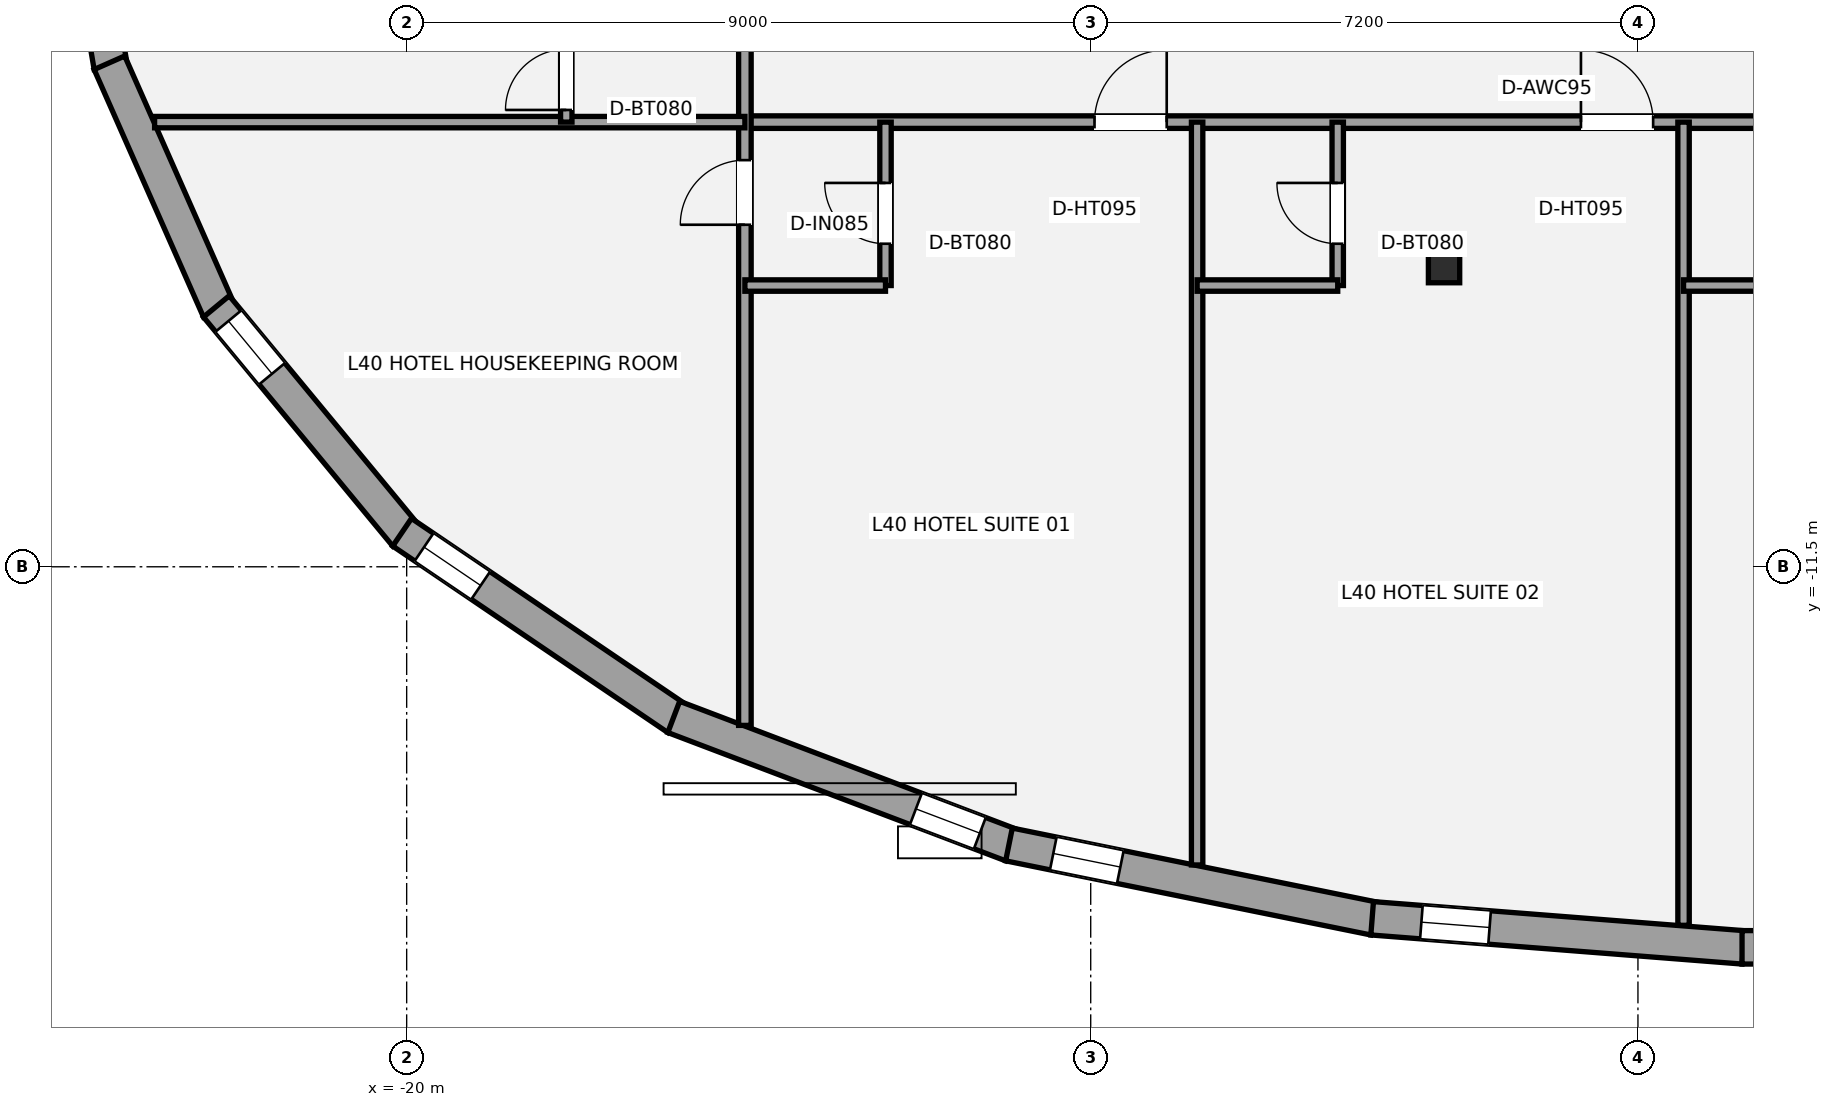
"""IFC4 building model, lengths in metres.
Left out: names, types, materials, properties, quantities, classifications, styles, units other than length and angle.
Written with IfcOpenShell. Run it as: python <this file> out.ifc"""

import sys

from ifc_helpers import new_model, si_unit, direction, frame, frame_2d, origin, origin_2d, place, context, subcontext, project, spatial, rectangle, i_section, extrude, element, fill, save


model = new_model("IFC4")
c1 = context("Model", 3, precision=1e-05, world=origin(), true_north=direction((0.0, 1.0)))
c2 = subcontext(c1, "Body", "Model", "MODEL_VIEW")
j1 = project(units=[si_unit("LENGTHUNIT", "METRE"), si_unit("PLANEANGLEUNIT", "RADIAN")], contexts=[c1])
p1 = place(None, origin())
s1 = spatial("IfcSite", under=j1, at=p1, CompositionType="ELEMENT")
p2 = place(p1, origin())
s2 = spatial("IfcBuilding", under=s1, at=p2, CompositionType="ELEMENT")
p3 = place(p2, frame((0.0, 0.0, 150.2)))
s3 = spatial("IfcBuildingStorey", under=s2, at=p3, CompositionType="ELEMENT", Elevation=150.2)
p4 = place(p3, frame((-6.351, -7.546, 0.0), z_axis=(0.0, 0.0, 1.0), x_axis=(1.0, 0.0, 0.0)))
e1 = element("IfcColumn", 1, at=p4, inside=s3, PredefinedType="COLUMN", context=c2, shape_type="SweptSolid", body=[
    extrude(i_section(OverallWidth=0.412, OverallDepth=0.435, WebThickness=0.036, FlangeThickness=0.057, at=origin_2d()), origin(), (0.0, 0.0, 1.0), 3.2),
])
p5 = place(p3, frame((-23.895, -4.921, 0.0), z_axis=(0.0, 0.0, 1.0), x_axis=(-0.168075929829, 0.985774052109, 0.0)))
e2 = element("IfcWall", 2, at=p5, inside=s3, PredefinedType="STANDARD", context=c2, shape_type="SweptSolid", body=[
    extrude(rectangle(XDim=3.358, YDim=0.44, at=frame_2d((1.679, 0.0))), origin(), (0.0, 0.0, 1.0), 2.315),
])
p6 = place(p5, frame((2.411, 0.0, 0.58)))
e3 = element("IfcOpeningElement", 3, at=p6, cuts=e2, PredefinedType="OPENING", context=c2, shape_type="SweptSolid", body=[
    extrude(rectangle(XDim=0.56, YDim=1.15, at=frame_2d((0.28, 0.575))), frame((0.0, 0.23, 0.0), z_axis=(0.0, -1.0, 0.0), x_axis=(1.0, 0.0, 0.0)), (0.0, 0.0, 1.0), 0.46),
])
p7 = place(p3, frame((-22.472, -8.126, 0.0), z_axis=(0.0, 0.0, 1.0), x_axis=(-0.403999745193, 0.914759097186, 0.0)))
e4 = element("IfcWall", 4, at=p7, inside=s3, PredefinedType="STANDARD", context=c2, shape_type="SweptSolid", body=[
    extrude(rectangle(XDim=3.561, YDim=0.44, at=frame_2d((1.78, 0.0))), origin(), (0.0, 0.0, 1.0), 2.315),
])
p8 = place(p3, frame((-20.014, -11.088, 0.0), z_axis=(0.0, 0.0, 1.0), x_axis=(-0.637002505989, 0.77086173038, 0.0)))
e5 = element("IfcWall", 5, at=p8, inside=s3, PredefinedType="STANDARD", context=c2, shape_type="SweptSolid", body=[
    extrude(rectangle(XDim=3.908, YDim=0.44, at=frame_2d((1.954, 0.0))), origin(), (0.0, 0.0, 1.0), 2.315),
])
p9 = place(p8, frame((2.76, 0.0, 0.58)))
e6 = element("IfcOpeningElement", 6, at=p9, cuts=e5, PredefinedType="OPENING", context=c2, shape_type="SweptSolid", body=[
    extrude(rectangle(XDim=0.9, YDim=1.35, at=frame_2d((0.45, 0.675))), frame((0.0, 0.23, 0.0), z_axis=(0.0, -1.0, 0.0), x_axis=(1.0, 0.0, 0.0)), (0.0, 0.0, 1.0), 0.46),
])
p10 = place(p3, frame((-16.441, -13.499, 0.0), z_axis=(0.0, 0.0, 1.0), x_axis=(-0.827782339513, 0.561049372507, 0.0)))
e7 = element("IfcWall", 7, at=p10, inside=s3, PredefinedType="STANDARD", context=c2, shape_type="SweptSolid", body=[
    extrude(rectangle(XDim=4.372, YDim=0.44, at=frame_2d((2.186, 0.0))), origin(), (0.0, 0.0, 1.0), 2.315),
])
p11 = place(p10, frame((3.124, 0.0, 0.58)))
e8 = element("IfcOpeningElement", 8, at=p11, cuts=e7, PredefinedType="OPENING", context=c2, shape_type="SweptSolid", body=[
    extrude(rectangle(XDim=0.9, YDim=1.35, at=frame_2d((0.45, 0.675))), frame((0.0, 0.23, 0.0), z_axis=(0.0, -1.0, 0.0), x_axis=(1.0, 0.0, 0.0)), (0.0, 0.0, 1.0), 0.46),
])
p12 = place(p3, frame((-12.041, -15.163, 0.0), z_axis=(0.0, 0.0, 1.0), x_axis=(-0.93488004884, 0.354963792916, 0.0)))
e9 = element("IfcWall", 9, at=p12, inside=s3, PredefinedType="STANDARD", context=c2, shape_type="SweptSolid", body=[
    extrude(rectangle(XDim=4.755, YDim=0.44, at=frame_2d((2.377, 0.0))), origin(), (0.0, 0.0, 1.0), 2.315),
])
p13 = place(p12, frame((0.447, 0.0, 0.58)))
e10 = element("IfcOpeningElement", 10, at=p13, cuts=e9, PredefinedType="OPENING", context=c2, shape_type="SweptSolid", body=[
    extrude(rectangle(XDim=0.9, YDim=1.35, at=frame_2d((0.45, 0.675))), frame((0.0, 0.23, 0.0), z_axis=(0.0, -1.0, 0.0), x_axis=(1.0, 0.0, 0.0)), (0.0, 0.0, 1.0), 0.46),
])
p14 = place(p3, frame((-7.271, -16.128, 0.0), z_axis=(0.0, 0.0, 1.0), x_axis=(-0.980021305588, 0.198892535291, 0.0)))
e11 = element("IfcWall", 11, at=p14, inside=s3, PredefinedType="STANDARD", context=c2, shape_type="SweptSolid", body=[
    extrude(rectangle(XDim=4.903, YDim=0.44, at=frame_2d((2.451, 0.0))), origin(), (0.0, 0.0, 1.0), 2.315),
])
p15 = place(p14, frame((3.408, 0.0, 0.58)))
e12 = element("IfcOpeningElement", 12, at=p15, cuts=e11, PredefinedType="OPENING", context=c2, shape_type="SweptSolid", body=[
    extrude(rectangle(XDim=0.9, YDim=1.35, at=frame_2d((0.45, 0.675))), frame((0.0, 0.23, 0.0), z_axis=(0.0, -1.0, 0.0), x_axis=(1.0, 0.0, 0.0)), (0.0, 0.0, 1.0), 0.46),
])
p16 = place(p3, frame((-2.413, -16.507, 0.0), z_axis=(0.0, 0.0, 1.0), x_axis=(-0.996946218403, 0.078091213409, 0.0)))
e13 = element("IfcWall", 13, at=p16, inside=s3, PredefinedType="STANDARD", context=c2, shape_type="SweptSolid", body=[
    extrude(rectangle(XDim=4.899, YDim=0.44, at=frame_2d((2.449, 0.0))), origin(), (0.0, 0.0, 1.0), 2.315),
])
p17 = place(p16, frame((3.349, 0.0, 0.58)))
e14 = element("IfcOpeningElement", 14, at=p17, cuts=e13, PredefinedType="OPENING", context=c2, shape_type="SweptSolid", body=[
    extrude(rectangle(XDim=0.9, YDim=1.35, at=frame_2d((0.45, 0.675))), frame((0.0, 0.23, 0.0), z_axis=(0.0, -1.0, 0.0), x_axis=(1.0, 0.0, 0.0)), (0.0, 0.0, 1.0), 0.46),
])
p18 = place(p3, frame((2.43, -16.507, 0.0), z_axis=(0.0, 0.0, 1.0), x_axis=(-1.0, 0.0, 0.0)))
e15 = element("IfcWall", 15, at=p18, inside=s3, PredefinedType="STANDARD", context=c2, shape_type="SweptSolid", body=[
    extrude(rectangle(XDim=4.861, YDim=0.44, at=frame_2d((2.43, 0.0))), origin(), (0.0, 0.0, 1.0), 2.315),
])
p19 = place(p18, frame((0.596, 0.0, 0.58)))
e16 = element("IfcOpeningElement", 16, at=p19, cuts=e15, PredefinedType="OPENING", context=c2, shape_type="SweptSolid", body=[
    extrude(rectangle(XDim=0.9, YDim=1.35, at=frame_2d((0.45, 0.675))), frame((0.0, 0.23, 0.0), z_axis=(0.0, -1.0, 0.0), x_axis=(1.0, 0.0, 0.0)), (0.0, 0.0, 1.0), 0.46),
])
p20 = place(p3, frame((-15.55, -5.65, 0.0), z_axis=(0.0, 0.0, 1.0), x_axis=(1.0, 0.0, 0.0)))
e17 = element("IfcWall", 17, at=p20, inside=s3, PredefinedType="PARTITIONING", context=c2, shape_type="SweptSolid", body=[
    extrude(rectangle(XDim=31.1, YDim=0.165, at=frame_2d((15.55, 0.0))), origin(), (0.0, 0.0, 1.0), 2.398),
])
p21 = place(p20, frame((4.6, 0.0, 0.0)))
e18 = element("IfcOpeningElement", 18, at=p21, cuts=e17, PredefinedType="OPENING", context=c2, shape_type="SweptSolid", body=[
    extrude(rectangle(XDim=0.95, YDim=2.15, at=frame_2d((0.475, 1.075))), frame((0.0, 0.093, 0.0), z_axis=(0.0, -1.0, 0.0), x_axis=(1.0, 0.0, 0.0)), (0.0, 0.0, 1.0), 0.185),
])
p22 = place(p20, frame((11.0, 0.0, 0.0)))
e19 = element("IfcOpeningElement", 19, at=p22, cuts=e17, PredefinedType="OPENING", context=c2, shape_type="SweptSolid", body=[
    extrude(rectangle(XDim=0.95, YDim=2.15, at=frame_2d((0.475, 1.075))), frame((0.0, 0.093, 0.0), z_axis=(0.0, -1.0, 0.0), x_axis=(1.0, 0.0, 0.0)), (0.0, 0.0, 1.0), 0.185),
])
p23 = place(p20, frame((17.4, 0.0, 0.0)))
e20 = element("IfcOpeningElement", 20, at=p23, cuts=e17, PredefinedType="OPENING", context=c2, shape_type="SweptSolid", body=[
    extrude(rectangle(XDim=0.95, YDim=2.15, at=frame_2d((0.475, 1.075))), frame((0.0, 0.093, 0.0), z_axis=(0.0, -1.0, 0.0), x_axis=(1.0, 0.0, 0.0)), (0.0, 0.0, 1.0), 0.185),
])
p24 = place(p20, frame((23.8, 0.0, 0.0)))
e21 = element("IfcOpeningElement", 21, at=p24, cuts=e17, PredefinedType="OPENING", context=c2, shape_type="SweptSolid", body=[
    extrude(rectangle(XDim=0.95, YDim=2.15, at=frame_2d((0.475, 1.075))), frame((0.0, 0.093, 0.0), z_axis=(0.0, -1.0, 0.0), x_axis=(1.0, 0.0, 0.0)), (0.0, 0.0, 1.0), 0.185),
])
p25 = place(p20, frame((29.75, 0.0, 0.0)))
e22 = element("IfcOpeningElement", 22, at=p25, cuts=e17, PredefinedType="OPENING", context=c2, shape_type="SweptSolid", body=[
    extrude(rectangle(XDim=0.95, YDim=2.15, at=frame_2d((0.475, 1.075))), frame((0.0, 0.093, 0.0), z_axis=(0.0, -1.0, 0.0), x_axis=(1.0, 0.0, 0.0)), (0.0, 0.0, 1.0), 0.185),
])
p26 = place(p3, frame((-15.55, -13.587, 0.0), z_axis=(0.0, 0.0, 1.0), x_axis=(0.0, 1.0, 0.0)))
e23 = element("IfcWall", 23, at=p26, inside=s3, PredefinedType="PARTITIONING", context=c2, shape_type="SweptSolid", body=[
    extrude(rectangle(XDim=21.137, YDim=0.165, at=frame_2d((10.568, 0.0))), origin(), (0.0, 0.0, 1.0), 2.473),
])
p27 = place(p26, frame((6.587, 0.0, 0.0)))
e24 = element("IfcOpeningElement", 24, at=p27, cuts=e23, PredefinedType="OPENING", context=c2, shape_type="SweptSolid", body=[
    extrude(rectangle(XDim=0.85, YDim=2.1, at=frame_2d((0.425, 1.05))), frame((0.0, 0.093, 0.0), z_axis=(0.0, -1.0, 0.0), x_axis=(1.0, 0.0, 0.0)), (0.0, 0.0, 1.0), 0.185),
])
p28 = place(p26, frame((10.637, 0.0, 0.0)))
e25 = element("IfcOpeningElement", 25, at=p28, cuts=e23, PredefinedType="OPENING", context=c2, shape_type="SweptSolid", body=[
    extrude(rectangle(XDim=0.95, YDim=2.15, at=frame_2d((0.475, 1.075))), frame((0.0, 0.093, 0.0), z_axis=(0.0, -1.0, 0.0), x_axis=(1.0, 0.0, 0.0)), (0.0, 0.0, 1.0), 0.185),
])
p29 = place(p26, frame((15.037, 0.0, 0.0)))
e26 = element("IfcOpeningElement", 26, at=p29, cuts=e23, PredefinedType="OPENING", context=c2, shape_type="SweptSolid", body=[
    extrude(rectangle(XDim=0.95, YDim=2.15, at=frame_2d((0.475, 1.075))), frame((0.0, 0.093, 0.0), z_axis=(0.0, -1.0, 0.0), x_axis=(1.0, 0.0, 0.0)), (0.0, 0.0, 1.0), 0.185),
])
p30 = place(p26, frame((19.787, 0.0, 0.0)))
e27 = element("IfcOpeningElement", 27, at=p30, cuts=e23, PredefinedType="OPENING", context=c2, shape_type="SweptSolid", body=[
    extrude(rectangle(XDim=0.95, YDim=2.15, at=frame_2d((0.475, 1.075))), frame((0.0, 0.093, 0.0), z_axis=(0.0, -1.0, 0.0), x_axis=(1.0, 0.0, 0.0)), (0.0, 0.0, 1.0), 0.185),
])
p31 = place(p3, frame((-23.316, -5.65, 0.0), z_axis=(0.0, 0.0, 1.0), x_axis=(1.0, 0.0, 0.0)))
e28 = element("IfcWall", 28, at=p31, inside=s3, PredefinedType="PLUMBINGWALL", context=c2, shape_type="SweptSolid", body=[
    extrude(rectangle(XDim=7.766, YDim=0.15, at=frame_2d((3.883, 0.0))), origin(), (0.0, 0.0, 1.0), 2.473),
])
p32 = place(p3, frame((-9.6, -15.423, 0.0), z_axis=(0.0, 0.0, 1.0), x_axis=(0.0, 1.0, 0.0)))
e29 = element("IfcWall", 29, at=p32, inside=s3, PredefinedType="PLUMBINGWALL", context=c2, shape_type="SweptSolid", body=[
    extrude(rectangle(XDim=9.773, YDim=0.15, at=frame_2d((4.886, 0.0))), origin(), (0.0, 0.0, 1.0), 2.473),
])
p33 = place(p3, frame((-3.2, -16.217, 0.0), z_axis=(0.0, 0.0, 1.0), x_axis=(0.0, 1.0, 0.0)))
e30 = element("IfcWall", 30, at=p33, inside=s3, PredefinedType="PLUMBINGWALL", context=c2, shape_type="SweptSolid", body=[
    extrude(rectangle(XDim=10.567, YDim=0.15, at=frame_2d((5.283, 0.0))), origin(), (0.0, 0.0, 1.0), 3.02),
])
p34 = place(p3, frame((-13.7, -7.8, 0.0), z_axis=(0.0, 0.0, 1.0), x_axis=(0.0, 1.0, 0.0)))
e31 = element("IfcWall", 31, at=p34, inside=s3, PredefinedType="PLUMBINGWALL", context=c2, shape_type="SweptSolid", body=[
    extrude(rectangle(XDim=2.15, YDim=0.15, at=frame_2d((1.075, 0.0))), origin(), (0.0, 0.0, 1.0), 2.473),
])
p35 = place(p34, frame((0.55, 0.0, 0.0)))
e32 = element("IfcOpeningElement", 32, at=p35, cuts=e31, PredefinedType="OPENING", context=c2, shape_type="SweptSolid", body=[
    extrude(rectangle(XDim=0.8, YDim=2.1, at=frame_2d((0.4, 1.05))), frame((0.0, 0.085, 0.0), z_axis=(0.0, -1.0, 0.0), x_axis=(1.0, 0.0, 0.0)), (0.0, 0.0, 1.0), 0.17),
])
p36 = place(p3, frame((-15.55, -7.8, 0.0), z_axis=(0.0, 0.0, 1.0), x_axis=(1.0, 0.0, 0.0)))
e33 = element("IfcWall", 33, at=p36, inside=s3, PredefinedType="PLUMBINGWALL", context=c2, shape_type="SweptSolid", body=[
    extrude(rectangle(XDim=1.85, YDim=0.15, at=frame_2d((0.925, 0.0))), origin(), (0.0, 0.0, 1.0), 3.02),
])
p37 = place(p3, frame((-7.75, -7.8, 0.0), z_axis=(0.0, 0.0, 1.0), x_axis=(0.0, 1.0, 0.0)))
e34 = element("IfcWall", 34, at=p37, inside=s3, PredefinedType="PLUMBINGWALL", context=c2, shape_type="SweptSolid", body=[
    extrude(rectangle(XDim=2.15, YDim=0.15, at=frame_2d((1.075, 0.0))), origin(), (0.0, 0.0, 1.0), 2.473),
])
p38 = place(p37, frame((0.55, 0.0, 0.0)))
e35 = element("IfcOpeningElement", 35, at=p38, cuts=e34, PredefinedType="OPENING", context=c2, shape_type="SweptSolid", body=[
    extrude(rectangle(XDim=0.8, YDim=2.1, at=frame_2d((0.4, 1.05))), frame((0.0, 0.085, 0.0), z_axis=(0.0, -1.0, 0.0), x_axis=(1.0, 0.0, 0.0)), (0.0, 0.0, 1.0), 0.17),
])
p39 = place(p3, frame((-9.6, -7.8, 0.0), z_axis=(0.0, 0.0, 1.0), x_axis=(1.0, 0.0, 0.0)))
e36 = element("IfcWall", 36, at=p39, inside=s3, PredefinedType="PLUMBINGWALL", context=c2, shape_type="SweptSolid", body=[
    extrude(rectangle(XDim=1.85, YDim=0.15, at=frame_2d((0.925, 0.0))), origin(), (0.0, 0.0, 1.0), 3.02),
])
p40 = place(p3, frame((-3.2, -7.8, 0.0), z_axis=(0.0, 0.0, 1.0), x_axis=(1.0, 0.0, 0.0)))
e37 = element("IfcWall", 37, at=p40, inside=s3, PredefinedType="PLUMBINGWALL", context=c2, shape_type="SweptSolid", body=[
    extrude(rectangle(XDim=1.85, YDim=0.15, at=frame_2d((0.925, 0.0))), origin(), (0.0, 0.0, 1.0), 3.02),
])
p41 = place(p3, frame((-17.9, -5.65, 0.0), z_axis=(0.0, 0.0, 1.0), x_axis=(0.0, 1.0, 0.0)))
e38 = element("IfcWall", 38, at=p41, inside=s3, PredefinedType="PLUMBINGWALL", context=c2, shape_type="SweptSolid", body=[
    extrude(rectangle(XDim=2.15, YDim=0.15, at=frame_2d((1.075, 0.0))), origin(), (0.0, 0.0, 1.0), 3.02),
])
p42 = place(p41, frame((0.16, 0.0, 0.0)))
e39 = element("IfcOpeningElement", 39, at=p42, cuts=e38, PredefinedType="OPENING", context=c2, shape_type="SweptSolid", body=[
    extrude(rectangle(XDim=0.8, YDim=2.1, at=frame_2d((0.4, 1.05))), frame((0.0, 0.085, 0.0), z_axis=(0.0, -1.0, 0.0), x_axis=(1.0, 0.0, 0.0)), (0.0, 0.0, 1.0), 0.17),
])
p43 = place(p9, origin())
e40 = element("IfcWindow", 40, at=p43, inside=s3, PartitioningType="SINGLE_PANEL", PredefinedType="WINDOW", context=c2, shape_type="SweptSolid", body=[
    extrude(rectangle(XDim=0.9, YDim=1.35, at=frame_2d((0.45, 0.675))), frame((0.0, -0.01, 0.0), z_axis=(0.0, -1.0, 0.0), x_axis=(1.0, 0.0, 0.0)), (0.0, 0.0, 1.0), 0.06),
])
fill(e6, e40)
p44 = place(p11, origin())
e41 = element("IfcWindow", 41, at=p44, inside=s3, PartitioningType="SINGLE_PANEL", PredefinedType="WINDOW", context=c2, shape_type="SweptSolid", body=[
    extrude(rectangle(XDim=0.9, YDim=1.35, at=frame_2d((0.45, 0.675))), frame((0.0, -0.01, 0.0), z_axis=(0.0, -1.0, 0.0), x_axis=(1.0, 0.0, 0.0)), (0.0, 0.0, 1.0), 0.06),
])
fill(e8, e41)
p45 = place(p13, origin())
e42 = element("IfcWindow", 42, at=p45, inside=s3, PartitioningType="SINGLE_PANEL", PredefinedType="WINDOW", context=c2, shape_type="SweptSolid", body=[
    extrude(rectangle(XDim=0.9, YDim=1.35, at=frame_2d((0.45, 0.675))), frame((0.0, -0.01, 0.0), z_axis=(0.0, -1.0, 0.0), x_axis=(1.0, 0.0, 0.0)), (0.0, 0.0, 1.0), 0.06),
])
fill(e10, e42)
p46 = place(p15, origin())
e43 = element("IfcWindow", 43, at=p46, inside=s3, PartitioningType="SINGLE_PANEL", PredefinedType="WINDOW", context=c2, shape_type="SweptSolid", body=[
    extrude(rectangle(XDim=0.9, YDim=1.35, at=frame_2d((0.45, 0.675))), frame((0.0, -0.01, 0.0), z_axis=(0.0, -1.0, 0.0), x_axis=(1.0, 0.0, 0.0)), (0.0, 0.0, 1.0), 0.06),
])
fill(e12, e43)
p47 = place(p17, origin())
e44 = element("IfcWindow", 44, at=p47, inside=s3, PartitioningType="SINGLE_PANEL", PredefinedType="WINDOW", context=c2, shape_type="SweptSolid", body=[
    extrude(rectangle(XDim=0.9, YDim=1.35, at=frame_2d((0.45, 0.675))), frame((0.0, -0.01, 0.0), z_axis=(0.0, -1.0, 0.0), x_axis=(1.0, 0.0, 0.0)), (0.0, 0.0, 1.0), 0.06),
])
fill(e14, e44)
p48 = place(p27, origin())
e45 = element("IfcDoor", 45, at=p48, inside=s3, OperationType="SINGLE_SWING_LEFT", PredefinedType="DOOR", context=c2, shape_type="SweptSolid", body=[
    extrude(rectangle(XDim=0.85, YDim=2.1, at=frame_2d((0.425, 1.05))), frame((0.0, 0.025, 0.0), z_axis=(0.0, -1.0, 0.0), x_axis=(1.0, 0.0, 0.0)), (0.0, 0.0, 1.0), 0.05),
])
fill(e24, e45)
p49 = place(p21, origin())
e46 = element("IfcDoor", 46, at=p49, inside=s3, OperationType="SINGLE_SWING_RIGHT", PredefinedType="DOOR", context=c2, shape_type="SweptSolid", body=[
    extrude(rectangle(XDim=0.95, YDim=2.15, at=frame_2d((0.475, 1.075))), frame((0.0, 0.025, 0.0), z_axis=(0.0, -1.0, 0.0), x_axis=(1.0, 0.0, 0.0)), (0.0, 0.0, 1.0), 0.05),
])
fill(e18, e46)
p50 = place(p35, origin())
e47 = element("IfcDoor", 47, at=p50, inside=s3, OperationType="SINGLE_SWING_RIGHT", PredefinedType="DOOR", context=c2, shape_type="SweptSolid", body=[
    extrude(rectangle(XDim=0.8, YDim=2.1, at=frame_2d((0.4, 1.05))), frame((0.0, 0.025, 0.0), z_axis=(0.0, -1.0, 0.0), x_axis=(1.0, 0.0, 0.0)), (0.0, 0.0, 1.0), 0.05),
])
fill(e32, e47)
p51 = place(p22, origin())
e48 = element("IfcDoor", 48, at=p51, inside=s3, OperationType="SINGLE_SWING_LEFT", PredefinedType="DOOR", context=c2, shape_type="SweptSolid", body=[
    extrude(rectangle(XDim=0.95, YDim=2.15, at=frame_2d((0.475, 1.075))), frame((0.0, 0.025, 0.0), z_axis=(0.0, -1.0, 0.0), x_axis=(1.0, 0.0, 0.0)), (0.0, 0.0, 1.0), 0.05),
])
fill(e19, e48)
p52 = place(p38, origin())
e49 = element("IfcDoor", 49, at=p52, inside=s3, OperationType="SINGLE_SWING_RIGHT", PredefinedType="DOOR", context=c2, shape_type="SweptSolid", body=[
    extrude(rectangle(XDim=0.8, YDim=2.1, at=frame_2d((0.4, 1.05))), frame((0.0, 0.025, 0.0), z_axis=(0.0, -1.0, 0.0), x_axis=(1.0, 0.0, 0.0)), (0.0, 0.0, 1.0), 0.05),
])
fill(e35, e49)
p53 = place(p42, origin())
e50 = element("IfcDoor", 50, at=p53, inside=s3, OperationType="SINGLE_SWING_LEFT", PredefinedType="DOOR", context=c2, shape_type="SweptSolid", body=[
    extrude(rectangle(XDim=0.8, YDim=2.1, at=frame_2d((0.4, 1.05))), frame((0.0, 0.025, 0.0), z_axis=(0.0, -1.0, 0.0), x_axis=(1.0, 0.0, 0.0)), (0.0, 0.0, 1.0), 0.05),
])
fill(e39, e50)
save(model, sys.argv[1])
